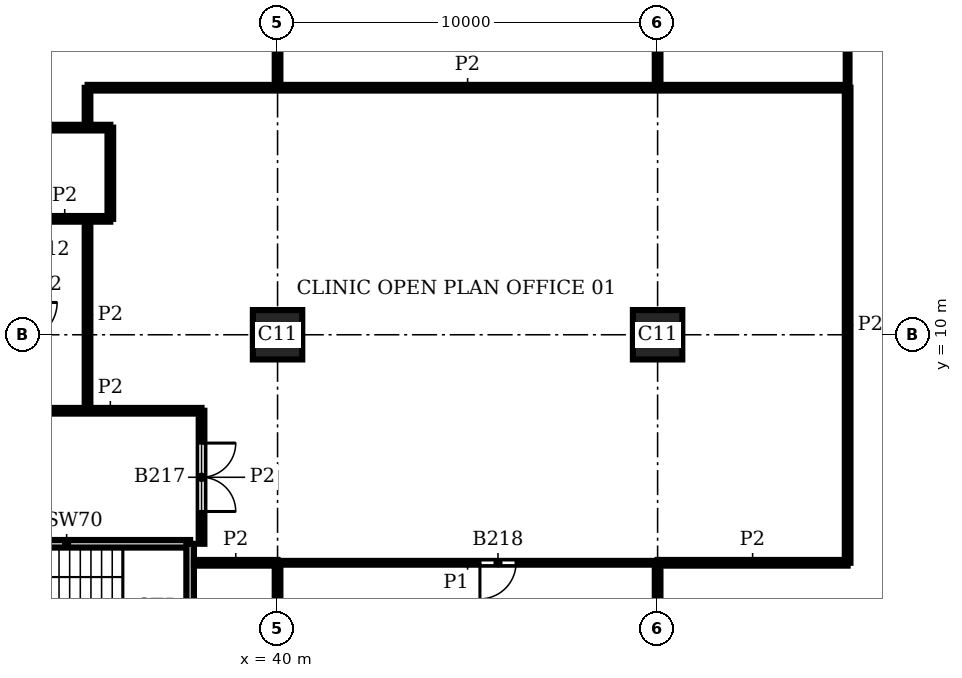
"""IFC4 building model, lengths in metres.
Left out: names, types, materials, properties, quantities, classifications, styles, units other than length and angle.
Written with IfcOpenShell. Run it as: python <this file> out.ifc"""

import sys

from ifc_helpers import new_model, si_unit, direction, frame, frame_2d, origin, origin_2d, place, context, subcontext, project, spatial, rectangle, extrude, element, fill, save


model = new_model("IFC4")
c1 = context("Model", 3, precision=1e-05, world=origin(), true_north=direction((0.0, 1.0)))
c2 = subcontext(c1, "Body", "Model", "MODEL_VIEW")
j1 = project(units=[si_unit("LENGTHUNIT", "METRE"), si_unit("PLANEANGLEUNIT", "RADIAN")], contexts=[c1])
p1 = place(None, origin())
s1 = spatial("IfcSite", under=j1, at=p1, CompositionType="ELEMENT")
p2 = place(p1, origin())
s2 = spatial("IfcBuilding", under=s1, at=p2, CompositionType="ELEMENT")
p3 = place(p2, frame((0.0, 0.0, 143.4)))
s3 = spatial("IfcBuildingStorey", under=s2, at=p3, CompositionType="ELEMENT", Elevation=143.4)
for number, where, z_axis, x_axis in (
    (1, (40.0, 10.0, 0.0), (0.0, 0.0, 1.0), (1.0, 0.0, 0.0)),
    (2, (50.0, 10.0, 0.0), (0.0, 0.0, 1.0), (1.0, 0.0, 0.0)),
):
    element("IfcColumn", number, at=place(p3, frame(where, z_axis=z_axis, x_axis=x_axis)), inside=s3, PredefinedType="COLUMN", context=c2, shape_type="SweptSolid", body=[
        extrude(rectangle(XDim=1.3, YDim=1.3, at=origin_2d()), origin(), (0.0, 0.0, 1.0), 3.9),
    ])
p4 = place(p3, frame((31.2, 4.5, 0.0), z_axis=(0.0, 0.0, 1.0), x_axis=(1.0, 0.0, 0.0)))
e3 = element("IfcWall", 3, at=p4, inside=s3, PredefinedType="SHEAR", context=c2, shape_type="SweptSolid", body=[
    extrude(rectangle(XDim=6.5, YDim=0.2, at=frame_2d((3.25, 0.0))), origin(), (0.0, 0.0, 1.0), 3.58),
])
p5 = place(p4, frame((0.375, 0.0, 0.0)))
e4 = element("IfcOpeningElement", 4, at=p5, cuts=e3, PredefinedType="OPENING", context=c2, shape_type="SweptSolid", body=[
    extrude(rectangle(XDim=1.0, YDim=2.1, at=frame_2d((0.5, 1.05))), frame((0.0, 0.11, 0.0), z_axis=(0.0, -1.0, 0.0), x_axis=(1.0, 0.0, 0.0)), (0.0, 0.0, 1.0), 0.22),
])
p6 = place(p3, frame((37.7, 1.2, 0.0), z_axis=(0.0, 0.0, 1.0), x_axis=(0.0, 1.0, 0.0)))
e5 = element("IfcWall", 5, at=p6, inside=s3, PredefinedType="SHEAR", context=c2, shape_type="SweptSolid", body=[
    extrude(rectangle(XDim=3.3, YDim=0.2, at=frame_2d((1.65, 0.0))), origin(), (0.0, 0.0, 1.0), 3.58),
])
p7 = place(p3, frame((55.0, 16.5, 0.0), z_axis=(0.0, 0.0, 1.0), x_axis=(0.0, 1.0, 0.0)))
e6 = element("IfcWall", 6, at=p7, inside=s3, PredefinedType="PARTITIONING", context=c2, shape_type="SweptSolid", body=[
    extrude(rectangle(XDim=9.5, YDim=0.1, at=frame_2d((4.75, 0.0))), origin(), (0.0, 0.0, 1.0), 3.58),
])
p8 = place(p7, frame((4.125, 0.0, 0.0)))
e7 = element("IfcOpeningElement", 7, at=p8, cuts=e6, PredefinedType="OPENING", context=c2, shape_type="SweptSolid", body=[
    extrude(rectangle(XDim=0.95, YDim=2.1, at=frame_2d((0.475, 1.05))), frame((0.0, 0.06, 0.0), z_axis=(0.0, -1.0, 0.0), x_axis=(1.0, 0.0, 0.0)), (0.0, 0.0, 1.0), 0.12),
])
p9 = place(p3, frame((40.0, 4.0, 0.0), z_axis=(0.0, 0.0, 1.0), x_axis=(1.0, 0.0, 0.0)))
e8 = element("IfcWall", 8, at=p9, inside=s3, PredefinedType="PARTITIONING", context=c2, shape_type="SweptSolid", body=[
    extrude(rectangle(XDim=10.0, YDim=0.1, at=frame_2d((5.0, 0.0))), origin(), (0.0, 0.0, 1.0), 3.58),
])
p10 = place(p9, frame((5.325, 0.0, 0.0)))
e9 = element("IfcOpeningElement", 9, at=p10, cuts=e8, PredefinedType="OPENING", context=c2, shape_type="SweptSolid", body=[
    extrude(rectangle(XDim=0.95, YDim=2.1, at=frame_2d((0.475, 1.05))), frame((0.0, 0.06, 0.0), z_axis=(0.0, -1.0, 0.0), x_axis=(1.0, 0.0, 0.0)), (0.0, 0.0, 1.0), 0.12),
])
p11 = place(p3, frame((35.0, 8.0, 0.0), z_axis=(0.0, 0.0, 1.0), x_axis=(0.0, 1.0, 0.0)))
e10 = element("IfcWall", 10, at=p11, inside=s3, PredefinedType="PARTITIONING", context=c2, shape_type="SweptSolid", body=[
    extrude(rectangle(XDim=5.05, YDim=0.15, at=frame_2d((2.525, 0.0))), origin(), (0.0, 0.0, 1.0), 3.58),
])
p12 = place(p3, frame((35.0, 15.451, 0.0), z_axis=(0.0, 0.0, 1.0), x_axis=(0.0, 1.0, 0.0)))
e11 = element("IfcWall", 11, at=p12, inside=s3, PredefinedType="PARTITIONING", context=c2, shape_type="SweptSolid", body=[
    extrude(rectangle(XDim=1.047, YDim=0.15, at=frame_2d((0.523, 0.0))), origin(), (0.0, 0.0, 1.0), 3.58),
])
p13 = place(p3, frame((35.6, 13.05, 0.0), z_axis=(0.0, 0.0, 1.0), x_axis=(0.0, 1.0, 0.0)))
e12 = element("IfcWall", 12, at=p13, inside=s3, PredefinedType="PARTITIONING", context=c2, shape_type="SweptSolid", body=[
    extrude(rectangle(XDim=2.4, YDim=0.15, at=frame_2d((1.2, 0.0))), origin(), (0.0, 0.0, 1.0), 3.58),
])
p14 = place(p3, frame((38.0, 4.5, 0.0), z_axis=(0.0, 0.0, 1.0), x_axis=(0.0, 1.0, 0.0)))
e13 = element("IfcWall", 13, at=p14, inside=s3, PredefinedType="PARTITIONING", context=c2, shape_type="SweptSolid", body=[
    extrude(rectangle(XDim=3.5, YDim=0.15, at=frame_2d((1.75, 0.0))), origin(), (0.0, 0.0, 1.0), 3.58),
])
p15 = place(p14, frame((0.85, 0.0, 0.0)))
e14 = element("IfcOpeningElement", 14, at=p15, cuts=e13, PredefinedType="OPENING", context=c2, shape_type="SweptSolid", body=[
    extrude(rectangle(XDim=1.8, YDim=2.1, at=frame_2d((0.9, 1.05))), frame((0.0, 0.085, 0.0), z_axis=(0.0, -1.0, 0.0), x_axis=(1.0, 0.0, 0.0)), (0.0, 0.0, 1.0), 0.17),
])
p16 = place(p3, frame((40.0, 0.45, 0.0), z_axis=(0.0, 0.0, 1.0), x_axis=(0.0, 1.0, 0.0)))
e15 = element("IfcWall", 15, at=p16, inside=s3, PredefinedType="PARTITIONING", context=c2, shape_type="SweptSolid", body=[
    extrude(rectangle(XDim=3.55, YDim=0.15, at=frame_2d((1.775, 0.0))), origin(), (0.0, 0.0, 1.0), 3.58),
])
p17 = place(p3, frame((40.0, 16.501, 0.0), z_axis=(0.0, 0.0, 1.0), x_axis=(0.0, 1.0, 0.0)))
e16 = element("IfcWall", 16, at=p17, inside=s3, PredefinedType="PARTITIONING", context=c2, shape_type="SweptSolid", body=[
    extrude(rectangle(XDim=2.849, YDim=0.15, at=frame_2d((1.425, 0.0))), origin(), (0.0, 0.0, 1.0), 3.58),
])
p18 = place(p3, frame((50.0, 0.45, 0.0), z_axis=(0.0, 0.0, 1.0), x_axis=(0.0, 1.0, 0.0)))
e17 = element("IfcWall", 17, at=p18, inside=s3, PredefinedType="PARTITIONING", context=c2, shape_type="SweptSolid", body=[
    extrude(rectangle(XDim=3.55, YDim=0.15, at=frame_2d((1.775, 0.0))), origin(), (0.0, 0.0, 1.0), 3.58),
])
p19 = place(p3, frame((50.0, 16.5, 0.0), z_axis=(0.0, 0.0, 1.0), x_axis=(0.0, 1.0, 0.0)))
e18 = element("IfcWall", 18, at=p19, inside=s3, PredefinedType="PARTITIONING", context=c2, shape_type="SweptSolid", body=[
    extrude(rectangle(XDim=2.85, YDim=0.15, at=frame_2d((1.425, 0.0))), origin(), (0.0, 0.0, 1.0), 3.58),
])
p20 = place(p3, frame((55.0, 4.0, 0.0), z_axis=(0.0, 0.0, 1.0), x_axis=(0.0, 1.0, 0.0)))
e19 = element("IfcWall", 19, at=p20, inside=s3, PredefinedType="PARTITIONING", context=c2, shape_type="SweptSolid", body=[
    extrude(rectangle(XDim=12.5, YDim=0.15, at=frame_2d((6.25, 0.0))), origin(), (0.0, 0.0, 1.0), 3.58),
])
p21 = place(p3, frame((37.8, 4.0, 0.0), z_axis=(0.0, 0.0, 1.0), x_axis=(1.0, 0.0, 0.0)))
e20 = element("IfcWall", 20, at=p21, inside=s3, PredefinedType="PARTITIONING", context=c2, shape_type="SweptSolid", body=[
    extrude(rectangle(XDim=2.2, YDim=0.15, at=frame_2d((1.1, 0.0))), origin(), (0.0, 0.0, 1.0), 3.58),
])
p22 = place(p3, frame((50.0, 4.0, 0.0), z_axis=(0.0, 0.0, 1.0), x_axis=(1.0, 0.0, 0.0)))
e21 = element("IfcWall", 21, at=p22, inside=s3, PredefinedType="PARTITIONING", context=c2, shape_type="SweptSolid", body=[
    extrude(rectangle(XDim=5.0, YDim=0.15, at=frame_2d((2.5, 0.0))), origin(), (0.0, 0.0, 1.0), 3.58),
])
p23 = place(p3, frame((33.2, 8.0, 0.0), z_axis=(0.0, 0.0, 1.0), x_axis=(1.0, 0.0, 0.0)))
e22 = element("IfcWall", 22, at=p23, inside=s3, PredefinedType="PARTITIONING", context=c2, shape_type="SweptSolid", body=[
    extrude(rectangle(XDim=4.8, YDim=0.15, at=frame_2d((2.4, 0.0))), origin(), (0.0, 0.0, 1.0), 3.58),
])
p24 = place(p3, frame((33.2, 13.05, 0.0), z_axis=(0.0, 0.0, 1.0), x_axis=(1.0, 0.0, 0.0)))
e23 = element("IfcWall", 23, at=p24, inside=s3, PredefinedType="PARTITIONING", context=c2, shape_type="SweptSolid", body=[
    extrude(rectangle(XDim=2.4, YDim=0.15, at=frame_2d((1.2, 0.0))), origin(), (0.0, 0.0, 1.0), 3.58),
])
p25 = place(p3, frame((33.201, 15.45, 0.0), z_axis=(0.0, 0.0, 1.0), x_axis=(1.0, 0.0, 0.0)))
e24 = element("IfcWall", 24, at=p25, inside=s3, PredefinedType="PARTITIONING", context=c2, shape_type="SweptSolid", body=[
    extrude(rectangle(XDim=2.399, YDim=0.15, at=frame_2d((1.2, 0.0))), origin(), (0.0, 0.0, 1.0), 3.58),
])
p26 = place(p3, frame((35.002, 16.5, 0.0), z_axis=(0.0, 0.0, 1.0), x_axis=(1.0, 0.0, 0.0)))
e25 = element("IfcWall", 25, at=p26, inside=s3, PredefinedType="PARTITIONING", context=c2, shape_type="SweptSolid", body=[
    extrude(rectangle(XDim=19.998, YDim=0.15, at=frame_2d((9.999, 0.0))), origin(), (0.0, 0.0, 1.0), 3.58),
])
p27 = place(p15, frame((1.8, 0.0, 0.0), z_axis=(0.0, 0.0, 1.0), x_axis=(-1.0, 0.0, 0.0)))
e26 = element("IfcDoor", 26, at=p27, inside=s3, OperationType="DOUBLE_DOOR_SINGLE_SWING", PredefinedType="DOOR", context=c2, shape_type="SweptSolid", body=[
    extrude(rectangle(XDim=1.8, YDim=2.1, at=frame_2d((0.9, 1.05))), frame((0.0, 0.025, 0.0), z_axis=(0.0, -1.0, 0.0), x_axis=(1.0, 0.0, 0.0)), (0.0, 0.0, 1.0), 0.05),
])
fill(e14, e26)
p28 = place(p10, frame((0.95, 0.0, 0.0), z_axis=(0.0, 0.0, 1.0), x_axis=(-1.0, 0.0, 0.0)))
e27 = element("IfcDoor", 27, at=p28, inside=s3, OperationType="SINGLE_SWING_RIGHT", PredefinedType="DOOR", context=c2, shape_type="SweptSolid", body=[
    extrude(rectangle(XDim=0.95, YDim=2.1, at=frame_2d((0.475, 1.05))), frame((0.0, 0.025, 0.0), z_axis=(0.0, -1.0, 0.0), x_axis=(1.0, 0.0, 0.0)), (0.0, 0.0, 1.0), 0.05),
])
fill(e9, e27)
save(model, sys.argv[1])
